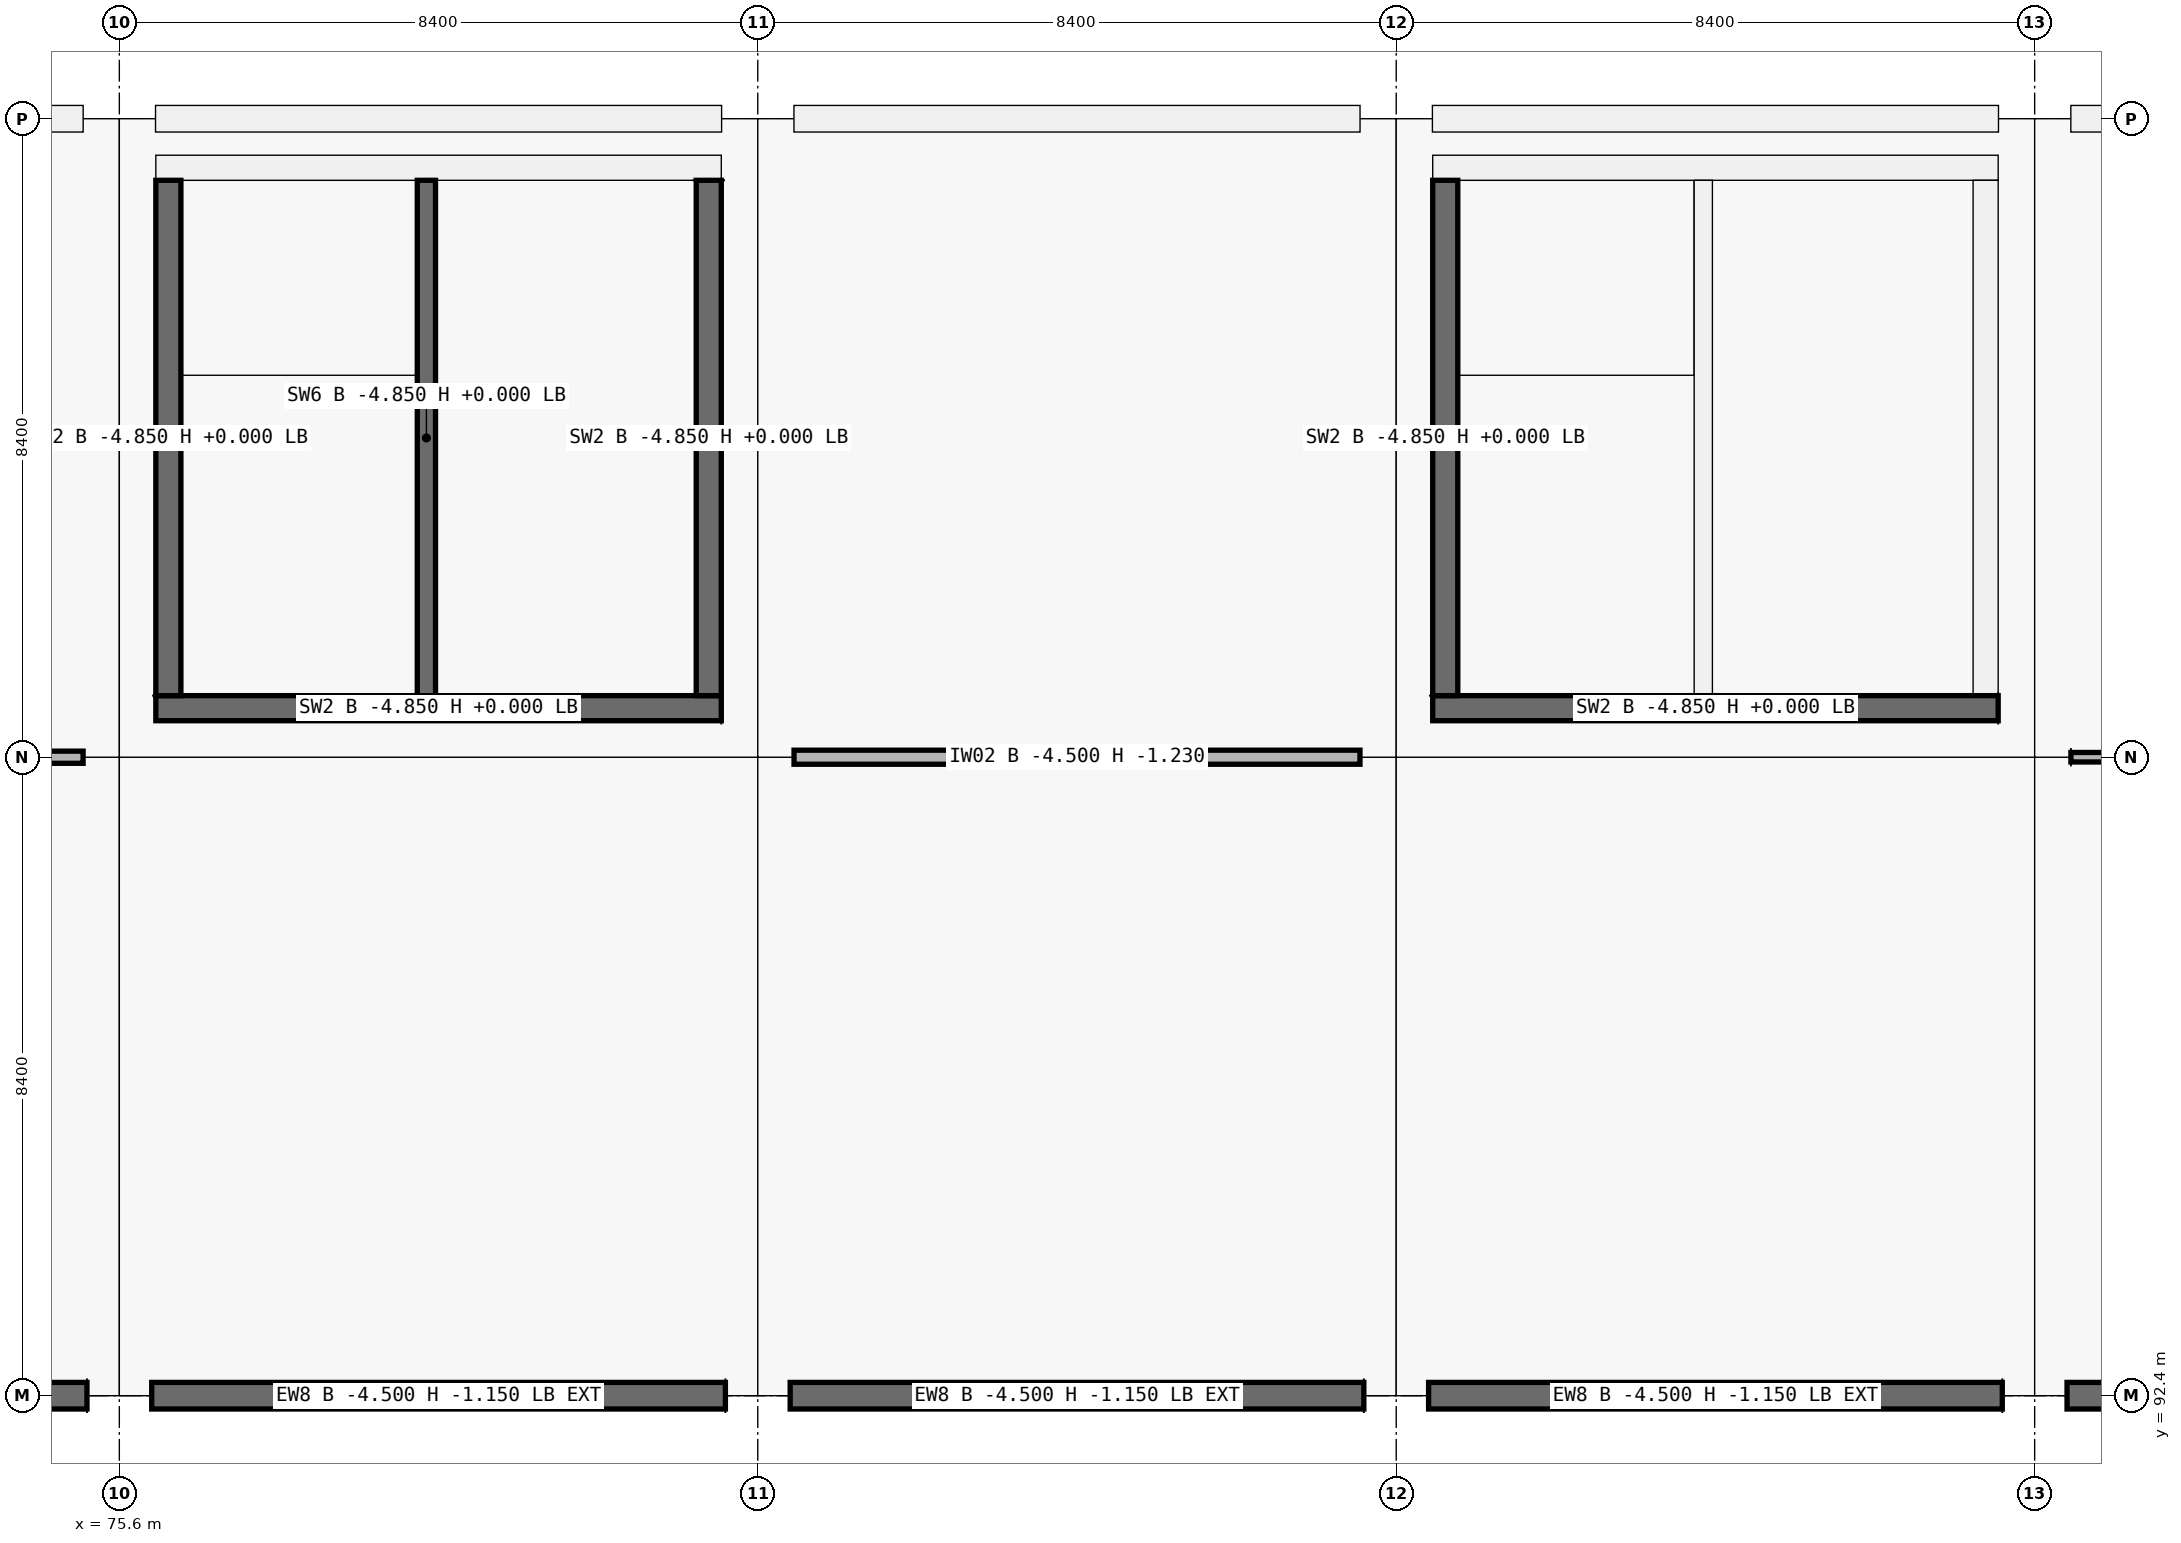
"""IFC4 building model, lengths in metres.
Left out: names, types, materials, properties, quantities, classifications, styles, units other than length and angle.
Written with IfcOpenShell. Run it as: python <this file> out.ifc"""

import sys

from ifc_helpers import new_model, si_unit, direction, frame, frame_2d, origin, origin_2d, place, context, subcontext, project, spatial, rectangle, extrude, element, fill, save


model = new_model("IFC4")
c1 = context("Model", 3, precision=1e-05, world=origin(), true_north=direction((0.0, 1.0)))
c2 = subcontext(c1, "Body", "Model", "MODEL_VIEW")
j1 = project(units=[si_unit("LENGTHUNIT", "METRE"), si_unit("PLANEANGLEUNIT", "RADIAN")], contexts=[c1])
p1 = place(None, origin())
s1 = spatial("IfcSite", under=j1, at=p1, CompositionType="ELEMENT")
p2 = place(p1, origin())
s2 = spatial("IfcBuilding", under=s1, at=p2, CompositionType="ELEMENT")
p3 = place(p2, frame((0.0, 0.0, -4.5)))
s3 = spatial("IfcBuildingStorey", under=s2, at=p3, CompositionType="ELEMENT", Elevation=-4.5)
p4 = place(p3, frame((75.6, 92.4, -0.35), z_axis=(0.0, 0.0, 1.0), x_axis=(1.0, 0.0, 0.0)))
e1 = element("IfcColumn", 1, at=p4, inside=s3, PredefinedType="COLUMN", context=c2, shape_type="SweptSolid", body=[
    extrude(rectangle(XDim=0.85, YDim=0.85, at=origin_2d()), origin(), (0.0, 0.0, 1.0), 4.5),
])
for number, where, z_axis, x_axis in (
    (2, (75.6, 100.8, -0.35), (0.0, 0.0, 1.0), (1.0, 0.0, 0.0)),
    (3, (75.6, 109.2, -0.35), (0.0, 0.0, 1.0), (1.0, 0.0, 0.0)),
):
    element("IfcColumn", number, at=place(p3, frame(where, z_axis=z_axis, x_axis=x_axis)), inside=s3, PredefinedType="COLUMN", context=c2, shape_type="SweptSolid", body=[
        extrude(rectangle(XDim=0.95, YDim=0.95, at=origin_2d()), origin(), (0.0, 0.0, 1.0), 4.85),
    ])
p5 = place(p3, frame((84.0, 92.4, -0.35), z_axis=(0.0, 0.0, 1.0), x_axis=(1.0, 0.0, 0.0)))
e4 = element("IfcColumn", 4, at=p5, inside=s3, PredefinedType="COLUMN", context=c2, shape_type="SweptSolid", body=[
    extrude(rectangle(XDim=0.85, YDim=0.85, at=origin_2d()), origin(), (0.0, 0.0, 1.0), 4.5),
])
for number, where, z_axis, x_axis in (
    (5, (84.0, 100.8, -0.35), (0.0, 0.0, 1.0), (1.0, 0.0, 0.0)),
    (6, (84.0, 109.2, -0.35), (0.0, 0.0, 1.0), (1.0, 0.0, 0.0)),
):
    element("IfcColumn", number, at=place(p3, frame(where, z_axis=z_axis, x_axis=x_axis)), inside=s3, PredefinedType="COLUMN", context=c2, shape_type="SweptSolid", body=[
        extrude(rectangle(XDim=0.95, YDim=0.95, at=origin_2d()), origin(), (0.0, 0.0, 1.0), 4.85),
    ])
p6 = place(p3, frame((92.4, 92.4, -0.35), z_axis=(0.0, 0.0, 1.0), x_axis=(1.0, 0.0, 0.0)))
e7 = element("IfcColumn", 7, at=p6, inside=s3, PredefinedType="COLUMN", context=c2, shape_type="SweptSolid", body=[
    extrude(rectangle(XDim=0.85, YDim=0.85, at=origin_2d()), origin(), (0.0, 0.0, 1.0), 4.5),
])
for number, where, z_axis, x_axis in (
    (8, (92.4, 100.8, -0.35), (0.0, 0.0, 1.0), (1.0, 0.0, 0.0)),
    (9, (92.4, 109.2, -0.35), (0.0, 0.0, 1.0), (1.0, 0.0, 0.0)),
):
    element("IfcColumn", number, at=place(p3, frame(where, z_axis=z_axis, x_axis=x_axis)), inside=s3, PredefinedType="COLUMN", context=c2, shape_type="SweptSolid", body=[
        extrude(rectangle(XDim=0.95, YDim=0.95, at=origin_2d()), origin(), (0.0, 0.0, 1.0), 4.85),
    ])
p7 = place(p3, frame((100.8, 92.4, -0.35), z_axis=(0.0, 0.0, 1.0), x_axis=(1.0, 0.0, 0.0)))
e10 = element("IfcColumn", 10, at=p7, inside=s3, PredefinedType="COLUMN", context=c2, shape_type="SweptSolid", body=[
    extrude(rectangle(XDim=0.85, YDim=0.85, at=origin_2d()), origin(), (0.0, 0.0, 1.0), 4.5),
])
for number, where, z_axis, x_axis in (
    (11, (100.8, 100.8, -0.35), (0.0, 0.0, 1.0), (1.0, 0.0, 0.0)),
    (12, (100.8, 109.2, -0.35), (0.0, 0.0, 1.0), (1.0, 0.0, 0.0)),
):
    element("IfcColumn", number, at=place(p3, frame(where, z_axis=z_axis, x_axis=x_axis)), inside=s3, PredefinedType="COLUMN", context=c2, shape_type="SweptSolid", body=[
        extrude(rectangle(XDim=0.95, YDim=0.95, at=origin_2d()), origin(), (0.0, 0.0, 1.0), 4.85),
    ])
p8 = place(p3, frame((75.174, 92.4, 0.0), z_axis=(0.0, 0.0, 1.0), x_axis=(-1.0, 0.0, 0.0)))
e13 = element("IfcWall", 13, at=p8, inside=s3, PredefinedType="SOLIDWALL", context=c2, shape_type="SweptSolid", body=[
    extrude(rectangle(XDim=7.548, YDim=0.35, at=frame_2d((3.774, 0.0))), origin(), (0.0, 0.0, 1.0), 3.35),
])
p9 = place(p3, frame((67.676, 109.2, 0.0), z_axis=(0.0, 0.0, 1.0), x_axis=(1.0, 0.0, 0.0)))
e14 = element("IfcWall", 14, at=p9, inside=s3, PredefinedType="SOLIDWALL", context=c2, shape_type="SweptSolid", body=[
    extrude(rectangle(XDim=7.448, YDim=0.35, at=frame_2d((3.724, 0.0))), origin(), (0.0, 0.0, 1.0), 3.35),
])
p10 = place(p3, frame((83.574, 92.4, 0.0), z_axis=(0.0, 0.0, 1.0), x_axis=(-1.0, 0.0, 0.0)))
e15 = element("IfcWall", 15, at=p10, inside=s3, PredefinedType="SOLIDWALL", context=c2, shape_type="SweptSolid", body=[
    extrude(rectangle(XDim=7.548, YDim=0.35, at=frame_2d((3.774, 0.0))), origin(), (0.0, 0.0, 1.0), 3.35),
])
p11 = place(p3, frame((76.076, 109.2, 0.0), z_axis=(0.0, 0.0, 1.0), x_axis=(1.0, 0.0, 0.0)))
e16 = element("IfcWall", 16, at=p11, inside=s3, PredefinedType="SOLIDWALL", context=c2, shape_type="SweptSolid", body=[
    extrude(rectangle(XDim=7.448, YDim=0.35, at=frame_2d((3.724, 0.0))), origin(), (0.0, 0.0, 1.0), 3.35),
])
p12 = place(p3, frame((91.974, 92.4, 0.0), z_axis=(0.0, 0.0, 1.0), x_axis=(-1.0, 0.0, 0.0)))
e17 = element("IfcWall", 17, at=p12, inside=s3, PredefinedType="SOLIDWALL", context=c2, shape_type="SweptSolid", body=[
    extrude(rectangle(XDim=7.548, YDim=0.35, at=frame_2d((3.774, 0.0))), origin(), (0.0, 0.0, 1.0), 3.35),
])
p13 = place(p3, frame((84.476, 109.2, 0.0), z_axis=(0.0, 0.0, 1.0), x_axis=(1.0, 0.0, 0.0)))
e18 = element("IfcWall", 18, at=p13, inside=s3, PredefinedType="SOLIDWALL", context=c2, shape_type="SweptSolid", body=[
    extrude(rectangle(XDim=7.448, YDim=0.35, at=frame_2d((3.724, 0.0))), origin(), (0.0, 0.0, 1.0), 3.35),
])
p14 = place(p3, frame((100.374, 92.4, 0.0), z_axis=(0.0, 0.0, 1.0), x_axis=(-1.0, 0.0, 0.0)))
e19 = element("IfcWall", 19, at=p14, inside=s3, PredefinedType="SOLIDWALL", context=c2, shape_type="SweptSolid", body=[
    extrude(rectangle(XDim=7.548, YDim=0.35, at=frame_2d((3.774, 0.0))), origin(), (0.0, 0.0, 1.0), 3.35),
])
p15 = place(p3, frame((92.876, 109.2, 0.0), z_axis=(0.0, 0.0, 1.0), x_axis=(1.0, 0.0, 0.0)))
e20 = element("IfcWall", 20, at=p15, inside=s3, PredefinedType="SOLIDWALL", context=c2, shape_type="SweptSolid", body=[
    extrude(rectangle(XDim=7.448, YDim=0.35, at=frame_2d((3.724, 0.0))), origin(), (0.0, 0.0, 1.0), 3.35),
])
p16 = place(p3, frame((108.774, 92.4, 0.0), z_axis=(0.0, 0.0, 1.0), x_axis=(-1.0, 0.0, 0.0)))
e21 = element("IfcWall", 21, at=p16, inside=s3, PredefinedType="SOLIDWALL", context=c2, shape_type="SweptSolid", body=[
    extrude(rectangle(XDim=7.548, YDim=0.35, at=frame_2d((3.774, 0.0))), origin(), (0.0, 0.0, 1.0), 3.35),
])
p17 = place(p3, frame((101.276, 109.2, 0.0), z_axis=(0.0, 0.0, 1.0), x_axis=(1.0, 0.0, 0.0)))
e22 = element("IfcWall", 22, at=p17, inside=s3, PredefinedType="SOLIDWALL", context=c2, shape_type="SweptSolid", body=[
    extrude(rectangle(XDim=7.448, YDim=0.35, at=frame_2d((3.724, 0.0))), origin(), (0.0, 0.0, 1.0), 3.35),
])
p18 = place(p3, frame((83.52, 101.445, -0.35), z_axis=(0.0, 0.0, 1.0), x_axis=(-1.0, 0.0, 0.0)))
e23 = element("IfcWall", 23, at=p18, inside=s3, PredefinedType="SHEAR", context=c2, shape_type="SweptSolid", body=[
    extrude(rectangle(XDim=7.44, YDim=0.33, at=frame_2d((3.72, 0.0))), origin(), (0.0, 0.0, 1.0), 4.85),
])
p19 = place(p18, frame((1.28, 0.0, 0.35)))
e24 = element("IfcOpeningElement", 24, at=p19, cuts=e23, PredefinedType="OPENING", context=c2, shape_type="SweptSolid", body=[
    extrude(rectangle(XDim=1.5, YDim=2.15, at=frame_2d((0.75, 1.075))), frame((0.0, 0.165, 0.0), z_axis=(0.0, -1.0, 0.0), x_axis=(1.0, 0.0, 0.0)), (0.0, 0.0, 1.0), 0.33),
])
p20 = place(p3, frame((76.245, 101.61, -0.35), z_axis=(0.0, 0.0, 1.0), x_axis=(0.0, 1.0, 0.0)))
e25 = element("IfcWall", 25, at=p20, inside=s3, PredefinedType="SHEAR", context=c2, shape_type="SweptSolid", body=[
    extrude(rectangle(XDim=6.78, YDim=0.33, at=frame_2d((3.39, 0.0))), origin(), (0.0, 0.0, 1.0), 4.85),
])
p21 = place(p3, frame((76.08, 108.555, -0.35), z_axis=(0.0, 0.0, 1.0), x_axis=(1.0, 0.0, 0.0)))
e26 = element("IfcWall", 26, at=p21, inside=s3, PredefinedType="SHEAR", context=c2, shape_type="SweptSolid", body=[
    extrude(rectangle(XDim=7.44, YDim=0.33, at=frame_2d((3.72, 0.0))), origin(), (0.0, 0.0, 1.0), 4.85),
])
p22 = place(p3, frame((83.355, 108.39, -0.35), z_axis=(0.0, 0.0, 1.0), x_axis=(0.0, -1.0, 0.0)))
e27 = element("IfcWall", 27, at=p22, inside=s3, PredefinedType="SHEAR", context=c2, shape_type="SweptSolid", body=[
    extrude(rectangle(XDim=6.78, YDim=0.33, at=frame_2d((3.39, 0.0))), origin(), (0.0, 0.0, 1.0), 4.85),
])
p23 = place(p22, frame((3.94, 0.0, 0.35)))
e28 = element("IfcOpeningElement", 28, at=p23, cuts=e27, PredefinedType="OPENING", context=c2, shape_type="SweptSolid", body=[
    extrude(rectangle(XDim=1.5, YDim=2.15, at=frame_2d((0.75, 1.075))), frame((0.0, 0.165, 0.0), z_axis=(0.0, -1.0, 0.0), x_axis=(1.0, 0.0, 0.0)), (0.0, 0.0, 1.0), 0.33),
])
p24 = place(p3, frame((79.64, 101.61, -0.35), z_axis=(0.0, 0.0, 1.0), x_axis=(0.0, 1.0, 0.0)))
e29 = element("IfcWall", 29, at=p24, inside=s3, PredefinedType="SHEAR", context=c2, shape_type="SweptSolid", body=[
    extrude(rectangle(XDim=6.78, YDim=0.24, at=frame_2d((3.39, 0.0))), origin(), (0.0, 0.0, 1.0), 4.85),
])
p25 = place(p24, frame((0.12, 0.0, 0.35)))
e30 = element("IfcOpeningElement", 30, at=p25, cuts=e29, PredefinedType="OPENING", context=c2, shape_type="SweptSolid", body=[
    extrude(rectangle(XDim=1.0, YDim=2.15, at=frame_2d((0.5, 1.075))), frame((0.0, 0.12, 0.0), z_axis=(0.0, -1.0, 0.0), x_axis=(1.0, 0.0, 0.0)), (0.0, 0.0, 1.0), 0.24),
])
p26 = place(p3, frame((100.32, 101.445, -0.35), z_axis=(0.0, 0.0, 1.0), x_axis=(-1.0, 0.0, 0.0)))
e31 = element("IfcWall", 31, at=p26, inside=s3, PredefinedType="SHEAR", context=c2, shape_type="SweptSolid", body=[
    extrude(rectangle(XDim=7.44, YDim=0.33, at=frame_2d((3.72, 0.0))), origin(), (0.0, 0.0, 1.0), 4.85),
])
p27 = place(p26, frame((1.28, 0.0, 0.35)))
e32 = element("IfcOpeningElement", 32, at=p27, cuts=e31, PredefinedType="OPENING", context=c2, shape_type="SweptSolid", body=[
    extrude(rectangle(XDim=1.5, YDim=2.15, at=frame_2d((0.75, 1.075))), frame((0.0, 0.165, 0.0), z_axis=(0.0, -1.0, 0.0), x_axis=(1.0, 0.0, 0.0)), (0.0, 0.0, 1.0), 0.33),
])
p28 = place(p3, frame((93.045, 101.61, -0.35), z_axis=(0.0, 0.0, 1.0), x_axis=(0.0, 1.0, 0.0)))
e33 = element("IfcWall", 33, at=p28, inside=s3, PredefinedType="SHEAR", context=c2, shape_type="SweptSolid", body=[
    extrude(rectangle(XDim=6.78, YDim=0.33, at=frame_2d((3.39, 0.0))), origin(), (0.0, 0.0, 1.0), 4.85),
])
p29 = place(p3, frame((92.88, 108.555, -0.35), z_axis=(0.0, 0.0, 1.0), x_axis=(1.0, 0.0, 0.0)))
e34 = element("IfcWall", 34, at=p29, inside=s3, PredefinedType="SHEAR", context=c2, shape_type="SweptSolid", body=[
    extrude(rectangle(XDim=7.44, YDim=0.33, at=frame_2d((3.72, 0.0))), origin(), (0.0, 0.0, 1.0), 4.85),
])
p30 = place(p3, frame((100.155, 108.39, -0.35), z_axis=(0.0, 0.0, 1.0), x_axis=(0.0, -1.0, 0.0)))
e35 = element("IfcWall", 35, at=p30, inside=s3, PredefinedType="SHEAR", context=c2, shape_type="SweptSolid", body=[
    extrude(rectangle(XDim=6.78, YDim=0.33, at=frame_2d((3.39, 0.0))), origin(), (0.0, 0.0, 1.0), 4.85),
])
p31 = place(p30, frame((3.94, 0.0, 0.35)))
e36 = element("IfcOpeningElement", 36, at=p31, cuts=e35, PredefinedType="OPENING", context=c2, shape_type="SweptSolid", body=[
    extrude(rectangle(XDim=1.5, YDim=2.15, at=frame_2d((0.75, 1.075))), frame((0.0, 0.165, 0.0), z_axis=(0.0, -1.0, 0.0), x_axis=(1.0, 0.0, 0.0)), (0.0, 0.0, 1.0), 0.33),
])
p32 = place(p3, frame((96.44, 101.61, -0.35), z_axis=(0.0, 0.0, 1.0), x_axis=(0.0, 1.0, 0.0)))
e37 = element("IfcWall", 37, at=p32, inside=s3, PredefinedType="SHEAR", context=c2, shape_type="SweptSolid", body=[
    extrude(rectangle(XDim=6.78, YDim=0.24, at=frame_2d((3.39, 0.0))), origin(), (0.0, 0.0, 1.0), 4.85),
])
p33 = place(p32, frame((0.12, 0.0, 0.35)))
e38 = element("IfcOpeningElement", 38, at=p33, cuts=e37, PredefinedType="OPENING", context=c2, shape_type="SweptSolid", body=[
    extrude(rectangle(XDim=1.0, YDim=2.15, at=frame_2d((0.5, 1.075))), frame((0.0, 0.12, 0.0), z_axis=(0.0, -1.0, 0.0), x_axis=(1.0, 0.0, 0.0)), (0.0, 0.0, 1.0), 0.24),
])
p34 = place(p3, frame((67.677, 100.8, 0.0), z_axis=(0.0, 0.0, 1.0), x_axis=(1.0, 0.0, 0.0)))
e39 = element("IfcWall", 39, at=p34, inside=s3, PredefinedType="PARTITIONING", context=c2, shape_type="SweptSolid", body=[
    extrude(rectangle(XDim=7.446, YDim=0.16, at=frame_2d((3.723, 0.0))), origin(), (0.0, 0.0, 1.0), 3.27),
])
p35 = place(p34, frame((3.223, 0.0, 0.0)))
e40 = element("IfcOpeningElement", 40, at=p35, cuts=e39, PredefinedType="OPENING", context=c2, shape_type="SweptSolid", body=[
    extrude(rectangle(XDim=1.0, YDim=2.15, at=frame_2d((0.5, 1.075))), frame((0.0, 0.08, 0.0), z_axis=(0.0, -1.0, 0.0), x_axis=(1.0, 0.0, 0.0)), (0.0, 0.0, 1.0), 0.16),
])
p36 = place(p3, frame((84.477, 100.8, 0.0), z_axis=(0.0, 0.0, 1.0), x_axis=(1.0, 0.0, 0.0)))
e41 = element("IfcWall", 41, at=p36, inside=s3, PredefinedType="PARTITIONING", context=c2, shape_type="SweptSolid", body=[
    extrude(rectangle(XDim=7.446, YDim=0.185, at=frame_2d((3.723, 0.0))), origin(), (0.0, 0.0, 1.0), 3.27),
])
p37 = place(p36, frame((3.218, 0.0, 0.0)))
e42 = element("IfcOpeningElement", 42, at=p37, cuts=e41, PredefinedType="OPENING", context=c2, shape_type="SweptSolid", body=[
    extrude(rectangle(XDim=1.01, YDim=2.12, at=frame_2d((0.505, 1.06))), frame((0.0, 0.093, 0.0), z_axis=(0.0, -1.0, 0.0), x_axis=(1.0, 0.0, 0.0)), (0.0, 0.0, 1.0), 0.185),
])
p38 = place(p3, frame((101.277, 100.8, 0.0), z_axis=(0.0, 0.0, 1.0), x_axis=(1.0, 0.0, 0.0)))
e43 = element("IfcWall", 43, at=p38, inside=s3, PredefinedType="PARTITIONING", context=c2, shape_type="SweptSolid", body=[
    extrude(rectangle(XDim=7.446, YDim=0.125, at=frame_2d((3.723, 0.0))), origin(), (0.0, 0.0, 1.0), 3.27),
])
p39 = place(p38, frame((3.238, 0.0, 0.0)))
e44 = element("IfcOpeningElement", 44, at=p39, cuts=e43, PredefinedType="OPENING", context=c2, shape_type="SweptSolid", body=[
    extrude(rectangle(XDim=0.97, YDim=2.12, at=frame_2d((0.485, 1.06))), frame((0.0, 0.062, 0.0), z_axis=(0.0, -1.0, 0.0), x_axis=(1.0, 0.0, 0.0)), (0.0, 0.0, 1.0), 0.125),
])
p40 = place(p25, origin())
e45 = element("IfcDoor", 45, at=p40, inside=s3, OperationType="SINGLE_SWING_RIGHT", PredefinedType="DOOR", context=c2, shape_type="SweptSolid", body=[
    extrude(rectangle(XDim=1.0, YDim=2.15, at=frame_2d((0.5, 1.075))), frame((0.0, 0.025, 0.0), z_axis=(0.0, -1.0, 0.0), x_axis=(1.0, 0.0, 0.0)), (0.0, 0.0, 1.0), 0.05),
])
fill(e30, e45)
p41 = place(p23, origin())
e46 = element("IfcDoor", 46, at=p41, inside=s3, OperationType="DOUBLE_DOOR_SINGLE_SWING", PredefinedType="DOOR", context=c2, shape_type="SweptSolid", body=[
    extrude(rectangle(XDim=1.5, YDim=2.15, at=frame_2d((0.75, 1.075))), frame((0.0, 0.025, 0.0), z_axis=(0.0, -1.0, 0.0), x_axis=(1.0, 0.0, 0.0)), (0.0, 0.0, 1.0), 0.05),
])
fill(e28, e46)
p42 = place(p19, origin())
e47 = element("IfcDoor", 47, at=p42, inside=s3, OperationType="DOUBLE_DOOR_SINGLE_SWING", PredefinedType="DOOR", context=c2, shape_type="SweptSolid", body=[
    extrude(rectangle(XDim=1.5, YDim=2.15, at=frame_2d((0.75, 1.075))), frame((0.0, 0.025, 0.0), z_axis=(0.0, -1.0, 0.0), x_axis=(1.0, 0.0, 0.0)), (0.0, 0.0, 1.0), 0.05),
])
fill(e24, e47)
p43 = place(p33, origin())
e48 = element("IfcDoor", 48, at=p43, inside=s3, OperationType="SINGLE_SWING_LEFT", PredefinedType="DOOR", context=c2, shape_type="SweptSolid", body=[
    extrude(rectangle(XDim=1.0, YDim=2.15, at=frame_2d((0.5, 1.075))), frame((0.0, 0.025, 0.0), z_axis=(0.0, -1.0, 0.0), x_axis=(1.0, 0.0, 0.0)), (0.0, 0.0, 1.0), 0.05),
])
fill(e38, e48)
p44 = place(p31, origin())
e49 = element("IfcDoor", 49, at=p44, inside=s3, OperationType="DOUBLE_DOOR_SINGLE_SWING", PredefinedType="DOOR", context=c2, shape_type="SweptSolid", body=[
    extrude(rectangle(XDim=1.5, YDim=2.15, at=frame_2d((0.75, 1.075))), frame((0.0, 0.025, 0.0), z_axis=(0.0, -1.0, 0.0), x_axis=(1.0, 0.0, 0.0)), (0.0, 0.0, 1.0), 0.05),
])
fill(e36, e49)
p45 = place(p27, origin())
e50 = element("IfcDoor", 50, at=p45, inside=s3, OperationType="DOUBLE_DOOR_SINGLE_SWING", PredefinedType="DOOR", context=c2, shape_type="SweptSolid", body=[
    extrude(rectangle(XDim=1.5, YDim=2.15, at=frame_2d((0.75, 1.075))), frame((0.0, 0.025, 0.0), z_axis=(0.0, -1.0, 0.0), x_axis=(1.0, 0.0, 0.0)), (0.0, 0.0, 1.0), 0.05),
])
fill(e32, e50)
p46 = place(p37, origin())
e51 = element("IfcDoor", 51, at=p46, inside=s3, OperationType="SINGLE_SWING_RIGHT", PredefinedType="DOOR", context=c2, shape_type="SweptSolid", body=[
    extrude(rectangle(XDim=1.01, YDim=2.12, at=frame_2d((0.505, 1.06))), frame((0.0, 0.025, 0.0), z_axis=(0.0, -1.0, 0.0), x_axis=(1.0, 0.0, 0.0)), (0.0, 0.0, 1.0), 0.05),
])
fill(e42, e51)
save(model, sys.argv[1])
